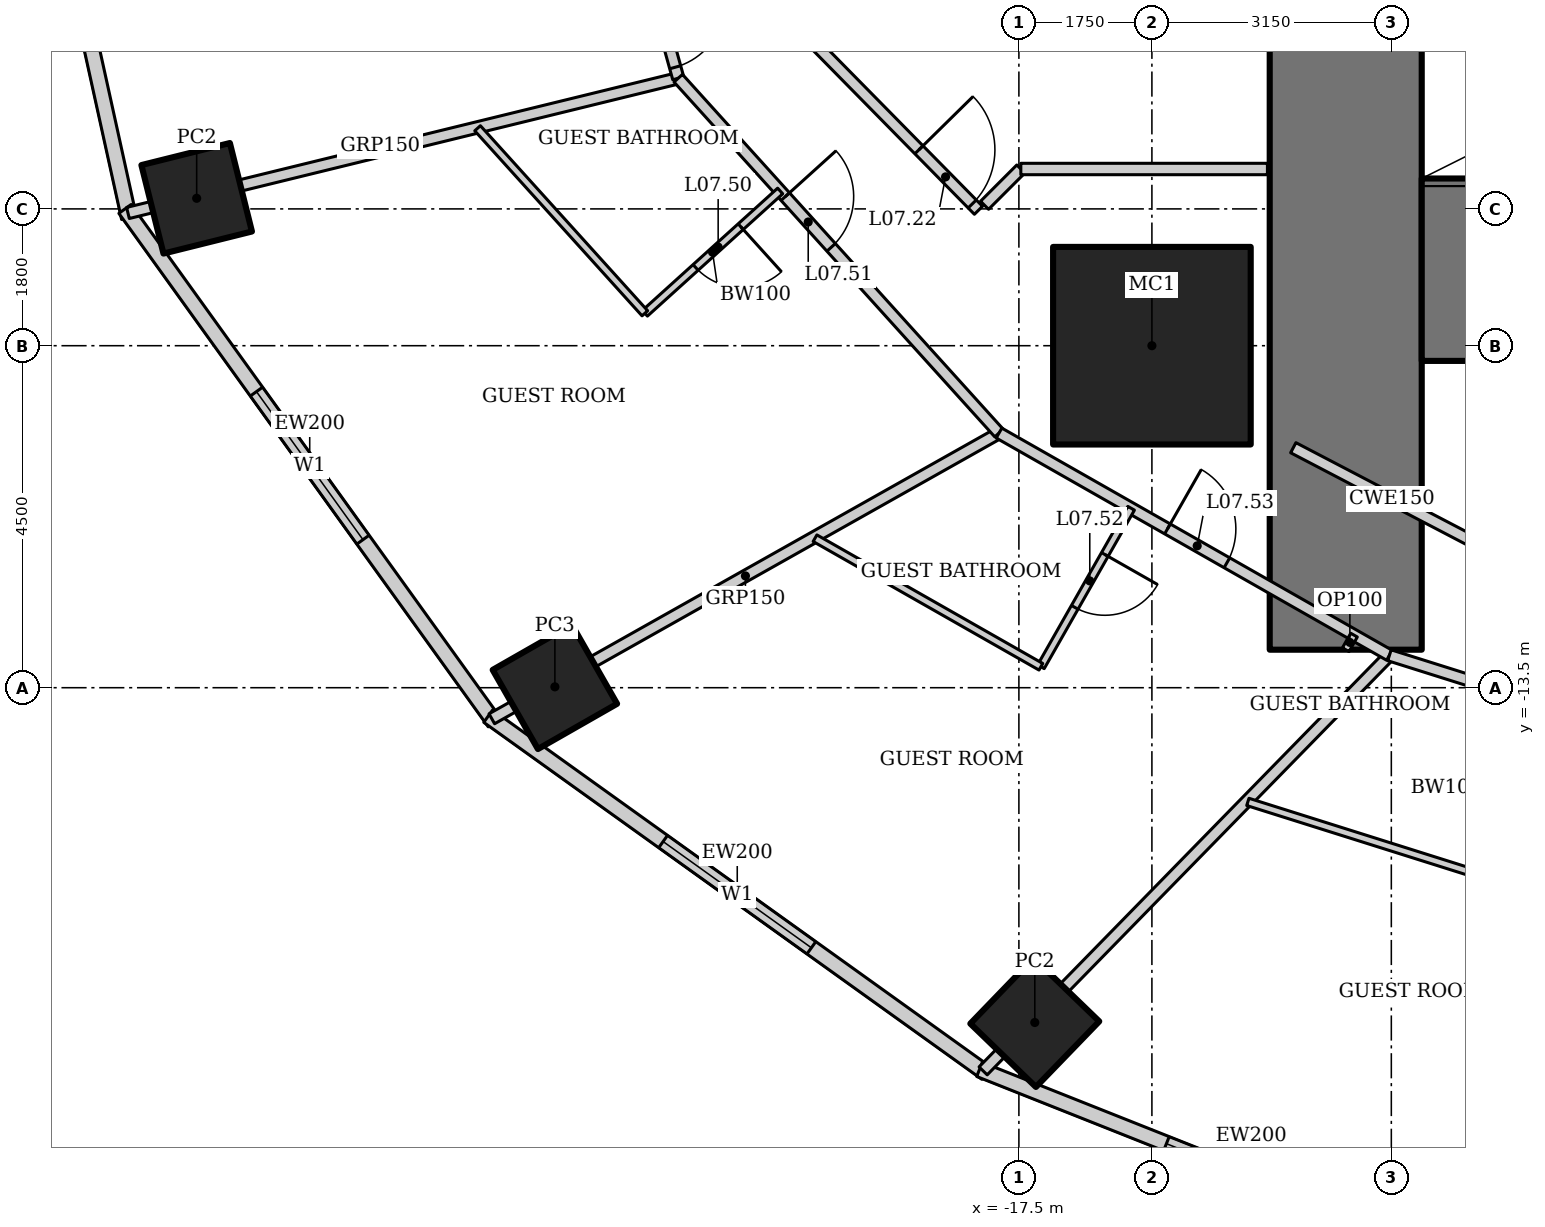
"""IFC4 building model, lengths in metres.
Left out: names, types, materials, properties, quantities, classifications, styles, units other than length and angle.
Written with IfcOpenShell. Run it as: python <this file> out.ifc"""

import sys

from ifc_helpers import new_model, si_unit, direction, frame, frame_2d, origin, origin_2d, place, context, subcontext, project, spatial, rectangle, hollow_rectangle, extrude, element, fill, save


model = new_model("IFC4")
c1 = context("Model", 3, precision=1e-05, world=origin(), true_north=direction((0.0, 1.0)))
c2 = subcontext(c1, "Body", "Model", "MODEL_VIEW")
j1 = project(units=[si_unit("LENGTHUNIT", "METRE"), si_unit("PLANEANGLEUNIT", "RADIAN")], contexts=[c1])
p1 = place(None, origin())
s1 = spatial("IfcSite", under=j1, at=p1, CompositionType="ELEMENT")
p2 = place(p1, origin())
s2 = spatial("IfcBuilding", under=s1, at=p2, CompositionType="ELEMENT")
p3 = place(p2, frame((0.0, 0.0, 40.6)))
s3 = spatial("IfcBuildingStorey", under=s2, at=p3, CompositionType="ELEMENT", Elevation=40.6)
p4 = place(p3, frame((-15.75, -9.0, 0.0), z_axis=(0.0, 0.0, 1.0), x_axis=(1.0, 0.0, 0.0)))
e1 = element("IfcColumn", 1, at=p4, inside=s3, PredefinedType="COLUMN", context=c2, shape_type="SweptSolid", body=[
    extrude(hollow_rectangle(XDim=2.6, YDim=2.6, WallThickness=0.13, at=origin_2d()), origin(), (0.0, 0.0, 1.0), 3.6),
])
p5 = place(p3, frame((-28.318, -7.06, 0.0), z_axis=(0.0, 0.0, 1.0), x_axis=(0.970295726276, 0.2419218956, 0.0)))
e2 = element("IfcColumn", 2, at=p5, inside=s3, PredefinedType="COLUMN", context=c2, shape_type="SweptSolid", body=[
    extrude(hollow_rectangle(XDim=1.2, YDim=1.2, WallThickness=0.1, at=origin_2d()), origin(), (0.0, 0.0, 1.0), 3.6),
])
p6 = place(p3, frame((-23.605, -13.489, 0.0), z_axis=(0.0, 0.0, 1.0), x_axis=(0.86824298017, 0.496139221777, 0.0)))
e3 = element("IfcColumn", 3, at=p6, inside=s3, PredefinedType="COLUMN", context=c2, shape_type="SweptSolid", body=[
    extrude(hollow_rectangle(XDim=1.2, YDim=1.2, WallThickness=0.12, at=origin_2d()), origin(), (0.0, 0.0, 1.0), 3.6),
])
p7 = place(p3, frame((-17.291, -17.905, 0.0), z_axis=(0.0, 0.0, 1.0), x_axis=(0.694658370459, 0.719339800339, 0.0)))
e4 = element("IfcColumn", 4, at=p7, inside=s3, PredefinedType="COLUMN", context=c2, shape_type="SweptSolid", body=[
    extrude(hollow_rectangle(XDim=1.2, YDim=1.2, WallThickness=0.1, at=origin_2d()), origin(), (0.0, 0.0, 1.0), 3.6),
])
p8 = place(p3, frame((-13.2, 13.0, 0.0), z_axis=(0.0, 0.0, 1.0), x_axis=(0.0, -1.0, 0.0)))
e5 = element("IfcWall", 5, at=p8, inside=s3, PredefinedType="SHEAR", context=c2, shape_type="SweptSolid", body=[
    extrude(rectangle(XDim=26.0, YDim=2.0, at=frame_2d((13.0, 0.0))), origin(), (0.0, 0.0, 1.0), 3.6),
])
p9 = place(p8, frame((12.1, 0.0, 0.0)))
e6 = element("IfcOpeningElement", 6, at=p9, cuts=e5, PredefinedType="OPENING", context=c2, shape_type="SweptSolid", body=[
    extrude(rectangle(XDim=1.8, YDim=2.1, at=frame_2d((0.9, 1.05))), frame((0.0, 1.01, 0.0), z_axis=(0.0, -1.0, 0.0), x_axis=(1.0, 0.0, 0.0)), (0.0, 0.0, 1.0), 2.02),
])
p10 = place(p3, frame((-12.2, -8.0, 0.0), z_axis=(0.0, 0.0, 1.0), x_axis=(1.0, 0.0, 0.0)))
e7 = element("IfcWall", 7, at=p10, inside=s3, PredefinedType="SHEAR", context=c2, shape_type="SweptSolid", body=[
    extrude(rectangle(XDim=24.4, YDim=2.4, at=frame_2d((12.2, 0.0))), origin(), (0.0, 0.0, 1.0), 3.6),
])
p11 = place(p3, frame((-30.835, 0.067, 0.0), z_axis=(0.0, 0.0, 1.0), x_axis=(0.215238065514, -0.976561608478, 0.0)))
e8 = element("IfcWall", 8, at=p11, inside=s3, PredefinedType="SOLIDWALL", context=c2, shape_type="SweptSolid", body=[
    extrude(rectangle(XDim=7.562, YDim=0.2, at=frame_2d((3.781, 0.0))), origin(), (0.0, 0.0, 1.0), 3.45),
])
p12 = place(p11, frame((2.581, 0.0, 0.5)))
e9 = element("IfcOpeningElement", 9, at=p12, cuts=e8, PredefinedType="OPENING", context=c2, shape_type="SweptSolid", body=[
    extrude(rectangle(XDim=2.4, YDim=2.2, at=frame_2d((1.2, 1.1))), frame((0.0, 0.11, 0.0), z_axis=(0.0, -1.0, 0.0), x_axis=(1.0, 0.0, 0.0)), (0.0, 0.0, 1.0), 0.22),
])
p13 = place(p3, frame((-29.26, -7.2, 0.0), z_axis=(0.0, 0.0, 1.0), x_axis=(0.583937613703, -0.811798536155, 0.0)))
e10 = element("IfcWall", 10, at=p13, inside=s3, PredefinedType="SOLIDWALL", context=c2, shape_type="SweptSolid", body=[
    extrude(rectangle(XDim=8.323, YDim=0.2, at=frame_2d((4.162, 0.0))), origin(), (0.0, 0.0, 1.0), 3.45),
])
p14 = place(p13, frame((2.961, 0.0, 0.5)))
e11 = element("IfcOpeningElement", 11, at=p14, cuts=e10, PredefinedType="OPENING", context=c2, shape_type="SweptSolid", body=[
    extrude(rectangle(XDim=2.4, YDim=2.2, at=frame_2d((1.2, 1.1))), frame((0.0, 0.11, 0.0), z_axis=(0.0, -1.0, 0.0), x_axis=(1.0, 0.0, 0.0)), (0.0, 0.0, 1.0), 0.22),
])
p15 = place(p3, frame((-24.482, -13.875, 0.0), z_axis=(0.0, 0.0, 1.0), x_axis=(0.812791321576, -0.582554948112, 0.0)))
e12 = element("IfcWall", 12, at=p15, inside=s3, PredefinedType="SOLIDWALL", context=c2, shape_type="SweptSolid", body=[
    extrude(rectangle(XDim=8.063, YDim=0.2, at=frame_2d((4.032, 0.0))), origin(), (0.0, 0.0, 1.0), 3.45),
])
p16 = place(p15, frame((2.832, 0.0, 0.5)))
e13 = element("IfcOpeningElement", 13, at=p16, cuts=e12, PredefinedType="OPENING", context=c2, shape_type="SweptSolid", body=[
    extrude(rectangle(XDim=2.4, YDim=2.2, at=frame_2d((1.2, 1.1))), frame((0.0, 0.11, 0.0), z_axis=(0.0, -1.0, 0.0), x_axis=(1.0, 0.0, 0.0)), (0.0, 0.0, 1.0), 0.22),
])
p17 = place(p3, frame((-18.018, -18.523, 0.0), z_axis=(0.0, 0.0, 1.0), x_axis=(0.929358351251, -0.369178892895, 0.0)))
e14 = element("IfcWall", 14, at=p17, inside=s3, PredefinedType="SOLIDWALL", context=c2, shape_type="SweptSolid", body=[
    extrude(rectangle(XDim=7.692, YDim=0.2, at=frame_2d((3.846, 0.0))), origin(), (0.0, 0.0, 1.0), 3.45),
])
p18 = place(p17, frame((2.646, 0.0, 0.5)))
e15 = element("IfcOpeningElement", 15, at=p18, cuts=e14, PredefinedType="OPENING", context=c2, shape_type="SweptSolid", body=[
    extrude(rectangle(XDim=2.4, YDim=2.2, at=frame_2d((1.2, 1.1))), frame((0.0, 0.11, 0.0), z_axis=(0.0, -1.0, 0.0), x_axis=(1.0, 0.0, 0.0)), (0.0, 0.0, 1.0), 0.22),
])
p19 = place(p3, frame((-29.222, -7.254, 0.0), z_axis=(0.0, 0.0, 1.0), x_axis=(0.97130070913, 0.237854855832, 0.0)))
e16 = element("IfcWall", 16, at=p19, inside=s3, PredefinedType="PARTITIONING", context=c2, shape_type="SweptSolid", body=[
    extrude(rectangle(XDim=7.454, YDim=0.15, at=frame_2d((3.727, 0.0))), origin(), (0.0, 0.0, 1.0), 2.332),
])
p20 = place(p3, frame((-24.435, -13.909, 0.0), z_axis=(0.0, 0.0, 1.0), x_axis=(0.871267209855, 0.490808974074, 0.0)))
e17 = element("IfcWall", 17, at=p20, inside=s3, PredefinedType="PARTITIONING", context=c2, shape_type="SweptSolid", body=[
    extrude(rectangle(XDim=7.659, YDim=0.15, at=frame_2d((3.83, 0.0))), origin(), (0.0, 0.0, 1.0), 2.693),
])
p21 = place(p3, frame((-17.97, -18.542, 0.0), z_axis=(0.0, 0.0, 1.0), x_axis=(0.699032031211, 0.715090357467, 0.0)))
e18 = element("IfcWall", 18, at=p21, inside=s3, PredefinedType="PARTITIONING", context=c2, shape_type="SweptSolid", body=[
    extrude(rectangle(XDim=7.647, YDim=0.15, at=frame_2d((3.824, 0.0))), origin(), (0.0, 0.0, 1.0), 2.528),
])
p22 = place(p3, frame((-23.5, 0.0, 0.0), z_axis=(0.0, 0.0, 1.0), x_axis=(0.266933062421, -0.963715072097, 0.0)))
e19 = element("IfcWall", 19, at=p22, inside=s3, PredefinedType="PARTITIONING", context=c2, shape_type="SweptSolid", body=[
    extrude(rectangle(XDim=5.687, YDim=0.15, at=frame_2d((2.844, 0.0))), origin(), (0.0, 0.0, 1.0), 3.45),
])
p23 = place(p22, frame((4.637, 0.0, 0.0)))
e20 = element("IfcOpeningElement", 20, at=p23, cuts=e19, PredefinedType="OPENING", context=c2, shape_type="SweptSolid", body=[
    extrude(rectangle(XDim=0.9, YDim=2.1, at=frame_2d((0.45, 1.05))), frame((0.0, 0.085, 0.0), z_axis=(0.0, -1.0, 0.0), x_axis=(1.0, 0.0, 0.0)), (0.0, 0.0, 1.0), 0.17),
])
p24 = place(p3, frame((-21.982, -5.481, 0.0), z_axis=(0.0, 0.0, 1.0), x_axis=(0.670598380282, -0.741820606591, 0.0)))
e21 = element("IfcWall", 21, at=p24, inside=s3, PredefinedType="PARTITIONING", context=c2, shape_type="SweptSolid", body=[
    extrude(rectangle(XDim=6.293, YDim=0.15, at=frame_2d((3.147, 0.0))), origin(), (0.0, 0.0, 1.0), 3.45),
])
p25 = place(p24, frame((2.1, 0.0, 0.0)))
e22 = element("IfcOpeningElement", 22, at=p25, cuts=e21, PredefinedType="OPENING", context=c2, shape_type="SweptSolid", body=[
    extrude(rectangle(XDim=0.9, YDim=2.1, at=frame_2d((0.45, 1.05))), frame((0.0, 0.085, 0.0), z_axis=(0.0, -1.0, 0.0), x_axis=(1.0, 0.0, 0.0)), (0.0, 0.0, 1.0), 0.17),
])
p26 = place(p3, frame((-17.761, -10.149, 0.0), z_axis=(0.0, 0.0, 1.0), x_axis=(0.86907565943, -0.494679187136, 0.0)))
e23 = element("IfcWall", 23, at=p26, inside=s3, PredefinedType="PARTITIONING", context=c2, shape_type="SweptSolid", body=[
    extrude(rectangle(XDim=5.911, YDim=0.15, at=frame_2d((2.955, 0.0))), origin(), (0.0, 0.0, 1.0), 3.45),
])
p27 = place(p26, frame((2.55, 0.0, 0.0)))
e24 = element("IfcOpeningElement", 24, at=p27, cuts=e23, PredefinedType="OPENING", context=c2, shape_type="SweptSolid", body=[
    extrude(rectangle(XDim=0.9, YDim=2.1, at=frame_2d((0.45, 1.05))), frame((0.0, 0.085, 0.0), z_axis=(0.0, -1.0, 0.0), x_axis=(1.0, 0.0, 0.0)), (0.0, 0.0, 1.0), 0.17),
])
p28 = place(p3, frame((-12.625, -13.073, 0.0), z_axis=(0.0, 0.0, 1.0), x_axis=(0.953774229808, -0.30052407317, 0.0)))
e25 = element("IfcWall", 25, at=p28, inside=s3, PredefinedType="PARTITIONING", context=c2, shape_type="SweptSolid", body=[
    extrude(rectangle(XDim=5.388, YDim=0.15, at=frame_2d((2.694, 0.0))), origin(), (0.0, 0.0, 1.0), 3.45),
])
p29 = place(p28, frame((4.338, 0.0, 0.0)))
e26 = element("IfcOpeningElement", 26, at=p29, cuts=e25, PredefinedType="OPENING", context=c2, shape_type="SweptSolid", body=[
    extrude(rectangle(XDim=0.9, YDim=2.1, at=frame_2d((0.45, 1.05))), frame((0.0, 0.085, 0.0), z_axis=(0.0, -1.0, 0.0), x_axis=(1.0, 0.0, 0.0)), (0.0, 0.0, 1.0), 0.17),
])
p30 = place(p3, frame((-20.641, -6.964, 0.0), z_axis=(0.0, 0.0, 1.0), x_axis=(-0.741861025859, -0.670553665496, 0.0)))
e27 = element("IfcWall", 27, at=p30, inside=s3, PredefinedType="PARTITIONING", context=c2, shape_type="SweptSolid", body=[
    extrude(rectangle(XDim=2.4, YDim=0.1, at=frame_2d((1.2, 0.0))), origin(), (0.0, 0.0, 1.0), 3.45),
])
p31 = place(p30, frame((0.7, 0.0, 0.0)))
e28 = element("IfcOpeningElement", 28, at=p31, cuts=e27, PredefinedType="OPENING", context=c2, shape_type="SweptSolid", body=[
    extrude(rectangle(XDim=0.8, YDim=2.1, at=frame_2d((0.4, 1.05))), frame((0.0, 0.06, 0.0), z_axis=(0.0, -1.0, 0.0), x_axis=(1.0, 0.0, 0.0)), (0.0, 0.0, 1.0), 0.12),
])
p32 = place(p3, frame((-22.421, -8.574, 0.0), z_axis=(0.0, 0.0, 1.0), x_axis=(-0.670578246017, 0.741838807268, 0.0)))
e29 = element("IfcWall", 29, at=p32, inside=s3, PredefinedType="PARTITIONING", context=c2, shape_type="SweptSolid", body=[
    extrude(rectangle(XDim=3.282, YDim=0.1, at=frame_2d((1.641, 0.0))), origin(), (0.0, 0.0, 1.0), 3.45),
])
p33 = place(p3, frame((-16.023, -11.139, 0.0), z_axis=(0.0, 0.0, 1.0), x_axis=(-0.494659381266, -0.869086932663, 0.0)))
e30 = element("IfcWall", 30, at=p33, inside=s3, PredefinedType="PARTITIONING", context=c2, shape_type="SweptSolid", body=[
    extrude(rectangle(XDim=2.4, YDim=0.1, at=frame_2d((1.2, 0.0))), origin(), (0.0, 0.0, 1.0), 3.45),
])
p34 = place(p33, frame((0.7, 0.0, 0.0)))
e31 = element("IfcOpeningElement", 31, at=p34, cuts=e30, PredefinedType="OPENING", context=c2, shape_type="SweptSolid", body=[
    extrude(rectangle(XDim=0.8, YDim=2.1, at=frame_2d((0.4, 1.05))), frame((0.0, 0.06, 0.0), z_axis=(0.0, -1.0, 0.0), x_axis=(1.0, 0.0, 0.0)), (0.0, 0.0, 1.0), 0.12),
])
p35 = place(p3, frame((-17.21, -13.225, 0.0), z_axis=(0.0, 0.0, 1.0), x_axis=(-0.869041592831, 0.494739032147, 0.0)))
e32 = element("IfcWall", 32, at=p35, inside=s3, PredefinedType="PARTITIONING", context=c2, shape_type="SweptSolid", body=[
    extrude(rectangle(XDim=3.42, YDim=0.1, at=frame_2d((1.71, 0.0))), origin(), (0.0, 0.0, 1.0), 3.45),
])
p36 = place(p3, frame((-11.438, -15.963, 0.0), z_axis=(0.0, 0.0, 1.0), x_axis=(-0.953784420519, 0.300491728963, 0.0)))
e33 = element("IfcWall", 33, at=p36, inside=s3, PredefinedType="PARTITIONING", context=c2, shape_type="SweptSolid", body=[
    extrude(rectangle(XDim=3.197, YDim=0.1, at=frame_2d((1.599, 0.0))), origin(), (0.0, 0.0, 1.0), 3.45),
])
p37 = place(p3, frame((-13.2, -13.0, 0.0), z_axis=(0.0, 0.0, 1.0), x_axis=(0.49435138335, 0.869262164011, 0.0)))
e34 = element("IfcWall", 34, at=p37, inside=s3, PredefinedType="PARTITIONING", context=c2, shape_type="SweptSolid", body=[
    extrude(rectangle(XDim=0.221, YDim=0.1, at=frame_2d((0.11, 0.0))), origin(), (0.0, 0.0, 1.0), 3.45),
])
p38 = place(p3, frame((-20.183, -5.032, 0.0), z_axis=(0.0, 0.0, 1.0), x_axis=(0.701392176983, -0.712775570616, 0.0)))
e35 = element("IfcWall", 35, at=p38, inside=s3, PredefinedType="PARTITIONING", context=c2, shape_type="SweptSolid", body=[
    extrude(rectangle(XDim=3.067, YDim=0.15, at=frame_2d((1.533, 0.0))), origin(), (0.0, 0.0, 1.0), 3.45),
])
p39 = place(p38, frame((1.95, 0.0, 0.0)))
e36 = element("IfcOpeningElement", 36, at=p39, cuts=e35, PredefinedType="OPENING", context=c2, shape_type="SweptSolid", body=[
    extrude(rectangle(XDim=1.0, YDim=2.1, at=frame_2d((0.5, 1.05))), frame((0.0, 0.085, 0.0), z_axis=(0.0, -1.0, 0.0), x_axis=(1.0, 0.0, 0.0)), (0.0, 0.0, 1.0), 0.17),
])
p40 = place(p3, frame((-13.89, -10.342, 0.0), z_axis=(0.0, 0.0, 1.0), x_axis=(0.886275255135, -0.463158905922, 0.0)))
e37 = element("IfcWall", 37, at=p40, inside=s3, PredefinedType="PARTITIONING", context=c2, shape_type="SweptSolid", body=[
    extrude(rectangle(XDim=2.927, YDim=0.15, at=frame_2d((1.463, 0.0))), origin(), (0.0, 0.0, 1.0), 3.45),
])
p41 = place(p3, frame((-17.952, -7.152, 0.0), z_axis=(0.0, 0.0, 1.0), x_axis=(0.707106781187, 0.707106781187, 0.0)))
e38 = element("IfcWall", 38, at=p41, inside=s3, PredefinedType="PARTITIONING", context=c2, shape_type="SweptSolid", body=[
    extrude(rectangle(XDim=0.675, YDim=0.15, at=frame_2d((0.337, 0.0))), origin(), (0.0, 0.0, 1.0), 3.45),
])
p42 = place(p3, frame((-17.475, -6.675, 0.0), z_axis=(0.0, 0.0, 1.0), x_axis=(1.0, 0.0, 0.0)))
e39 = element("IfcWall", 39, at=p42, inside=s3, PredefinedType="PARTITIONING", context=c2, shape_type="SweptSolid", body=[
    extrude(rectangle(XDim=3.245, YDim=0.15, at=frame_2d((1.622, 0.0))), origin(), (0.0, 0.0, 1.0), 3.45),
])
p43 = place(p14, origin())
e40 = element("IfcWindow", 40, at=p43, inside=s3, PartitioningType="SINGLE_PANEL", PredefinedType="WINDOW", context=c2, shape_type="SweptSolid", body=[
    extrude(rectangle(XDim=2.4, YDim=2.2, at=frame_2d((1.2, 1.1))), frame((0.0, 0.03, 0.0), z_axis=(0.0, -1.0, 0.0), x_axis=(1.0, 0.0, 0.0)), (0.0, 0.0, 1.0), 0.06),
])
fill(e11, e40)
p44 = place(p16, origin())
e41 = element("IfcWindow", 41, at=p44, inside=s3, PartitioningType="SINGLE_PANEL", PredefinedType="WINDOW", context=c2, shape_type="SweptSolid", body=[
    extrude(rectangle(XDim=2.4, YDim=2.2, at=frame_2d((1.2, 1.1))), frame((0.0, 0.03, 0.0), z_axis=(0.0, -1.0, 0.0), x_axis=(1.0, 0.0, 0.0)), (0.0, 0.0, 1.0), 0.06),
])
fill(e13, e41)
p45 = place(p18, origin())
e42 = element("IfcWindow", 42, at=p45, inside=s3, PartitioningType="SINGLE_PANEL", PredefinedType="WINDOW", context=c2, shape_type="SweptSolid", body=[
    extrude(rectangle(XDim=2.4, YDim=2.2, at=frame_2d((1.2, 1.1))), frame((0.0, 0.03, 0.0), z_axis=(0.0, -1.0, 0.0), x_axis=(1.0, 0.0, 0.0)), (0.0, 0.0, 1.0), 0.06),
])
fill(e15, e42)
p46 = place(p39, origin())
e43 = element("IfcDoor", 43, at=p46, inside=s3, OperationType="SINGLE_SWING_LEFT", PredefinedType="DOOR", context=c2, shape_type="SweptSolid", body=[
    extrude(rectangle(XDim=1.0, YDim=2.1, at=frame_2d((0.5, 1.05))), frame((0.0, 0.025, 0.0), z_axis=(0.0, -1.0, 0.0), x_axis=(1.0, 0.0, 0.0)), (0.0, 0.0, 1.0), 0.05),
])
fill(e36, e43)
p47 = place(p23, origin())
e44 = element("IfcDoor", 44, at=p47, inside=s3, OperationType="SINGLE_SWING_LEFT", PredefinedType="DOOR", context=c2, shape_type="SweptSolid", body=[
    extrude(rectangle(XDim=0.9, YDim=2.1, at=frame_2d((0.45, 1.05))), frame((0.0, 0.025, 0.0), z_axis=(0.0, -1.0, 0.0), x_axis=(1.0, 0.0, 0.0)), (0.0, 0.0, 1.0), 0.05),
])
fill(e20, e44)
p48 = place(p31, origin())
e45 = element("IfcDoor", 45, at=p48, inside=s3, OperationType="SINGLE_SWING_LEFT", PredefinedType="DOOR", context=c2, shape_type="SweptSolid", body=[
    extrude(rectangle(XDim=0.8, YDim=2.1, at=frame_2d((0.4, 1.05))), frame((0.0, 0.025, 0.0), z_axis=(0.0, -1.0, 0.0), x_axis=(1.0, 0.0, 0.0)), (0.0, 0.0, 1.0), 0.05),
])
fill(e28, e45)
p49 = place(p25, origin())
e46 = element("IfcDoor", 46, at=p49, inside=s3, OperationType="SINGLE_SWING_LEFT", PredefinedType="DOOR", context=c2, shape_type="SweptSolid", body=[
    extrude(rectangle(XDim=0.9, YDim=2.1, at=frame_2d((0.45, 1.05))), frame((0.0, 0.025, 0.0), z_axis=(0.0, -1.0, 0.0), x_axis=(1.0, 0.0, 0.0)), (0.0, 0.0, 1.0), 0.05),
])
fill(e22, e46)
p50 = place(p34, origin())
e47 = element("IfcDoor", 47, at=p50, inside=s3, OperationType="SINGLE_SWING_LEFT", PredefinedType="DOOR", context=c2, shape_type="SweptSolid", body=[
    extrude(rectangle(XDim=0.8, YDim=2.1, at=frame_2d((0.4, 1.05))), frame((0.0, 0.025, 0.0), z_axis=(0.0, -1.0, 0.0), x_axis=(1.0, 0.0, 0.0)), (0.0, 0.0, 1.0), 0.05),
])
fill(e31, e47)
p51 = place(p27, origin())
e48 = element("IfcDoor", 48, at=p51, inside=s3, OperationType="SINGLE_SWING_LEFT", PredefinedType="DOOR", context=c2, shape_type="SweptSolid", body=[
    extrude(rectangle(XDim=0.9, YDim=2.1, at=frame_2d((0.45, 1.05))), frame((0.0, 0.025, 0.0), z_axis=(0.0, -1.0, 0.0), x_axis=(1.0, 0.0, 0.0)), (0.0, 0.0, 1.0), 0.05),
])
fill(e24, e48)
save(model, sys.argv[1])
